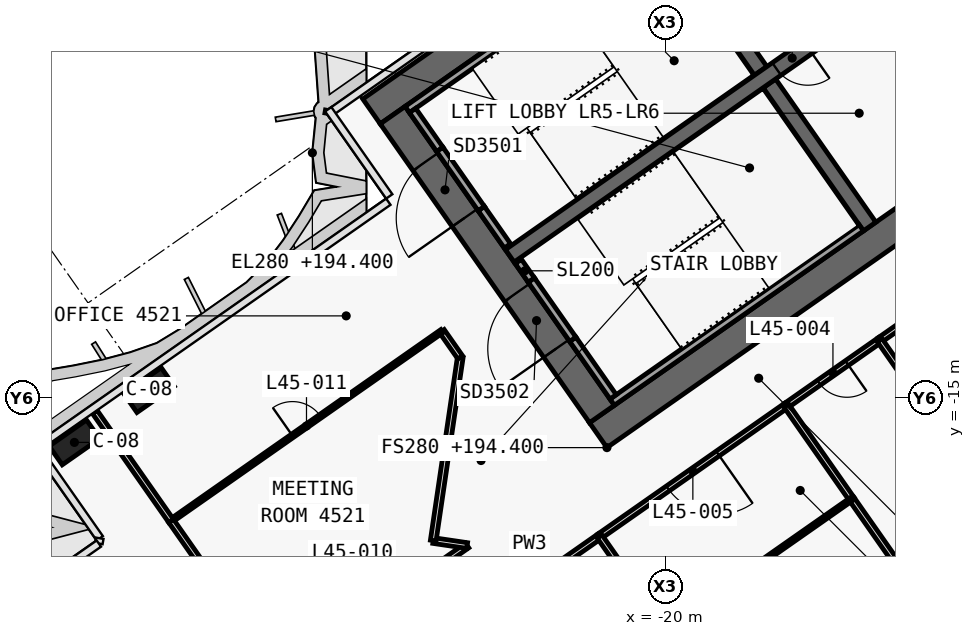
"""IFC4 building model, lengths in metres.
Left out: names, types, materials, properties, quantities, classifications, styles, units other than length and angle.
Written with IfcOpenShell. Run it as: python <this file> out.ifc"""

import sys

from ifc_helpers import new_model, si_unit, direction, frame, frame_2d, origin, origin_2d, place, context, subcontext, project, spatial, polyline, rectangle, outline, extrude, element, fill, save


model = new_model("IFC4")
c1 = context("Model", 3, precision=1e-05, world=origin(), true_north=direction((0.0, 1.0)))
c2 = subcontext(c1, "Body", "Model", "MODEL_VIEW")
j1 = project(units=[si_unit("LENGTHUNIT", "METRE"), si_unit("PLANEANGLEUNIT", "RADIAN")], contexts=[c1])
p1 = place(None, origin())
s1 = spatial("IfcSite", under=j1, at=p1, CompositionType="ELEMENT")
p2 = place(p1, origin())
s2 = spatial("IfcBuilding", under=s1, at=p2, CompositionType="ELEMENT")
p3 = place(p2, frame((0.0, 0.0, 194.4)))
s3 = spatial("IfcBuildingStorey", under=s2, at=p3, CompositionType="ELEMENT", Elevation=194.4)
p4 = place(p3, frame((0.029, 11.984, 0.0), z_axis=(0.0, 0.0, 1.0), x_axis=(-0.819151382952, -0.573577380837, 0.0)))
e1 = element("IfcWall", 1, at=p4, inside=s3, PredefinedType="SHEAR", context=c2, shape_type="SweptSolid", body=[
    extrude(outline(polyline([(33.898, 0.4), (0.56, 0.4), (-0.0, -0.4), (33.898, -0.4), (33.898, 0.4)])), origin(), (0.0, 0.0, 1.0), 3.9),
])
p5 = place(p3, frame((0.029, -0.712, 0.0), z_axis=(0.0, 0.0, 1.0), x_axis=(-0.819151758019, -0.573576845187, 0.0)))
e2 = element("IfcWall", 2, at=p5, inside=s3, PredefinedType="SHEAR", context=c2, shape_type="SweptSolid", body=[
    extrude(outline(polyline([(26.616, 0.4), (0.56, 0.4), (-0.0, -0.4), (26.616, -0.4), (26.616, 0.4)])), origin(), (0.0, 0.0, 1.0), 3.9),
])
p6 = place(p5, frame((2.966, 0.0, 0.0)))
e3 = element("IfcOpeningElement", 3, at=p6, cuts=e2, PredefinedType="OPENING", context=c2, shape_type="SweptSolid", body=[
    extrude(rectangle(XDim=2.4, YDim=2.1, at=frame_2d((1.2, 1.05))), frame((0.0, 0.41, 0.0), z_axis=(0.0, -1.0, 0.0), x_axis=(1.0, 0.0, 0.0)), (0.0, 0.0, 1.0), 0.82),
])
p7 = place(p5, frame((11.916, 0.0, 0.0)))
e4 = element("IfcOpeningElement", 4, at=p7, cuts=e2, PredefinedType="OPENING", context=c2, shape_type="SweptSolid", body=[
    extrude(rectangle(XDim=2.4, YDim=2.1, at=frame_2d((1.2, 1.05))), frame((0.0, 0.41, 0.0), z_axis=(0.0, -1.0, 0.0), x_axis=(1.0, 0.0, 0.0)), (0.0, 0.0, 1.0), 0.82),
])
p8 = place(p3, frame((-21.675, -15.421, 0.0), z_axis=(0.0, 0.0, 1.0), x_axis=(-0.573581815061, 0.819148278049, 0.0)))
e5 = element("IfcWall", 5, at=p8, inside=s3, PredefinedType="SHEAR", context=c2, shape_type="SweptSolid", body=[
    extrude(outline(polyline([(0.0, 0.4), (0.0, -0.4), (9.6, -0.4), (9.6, 0.4), (0.0, 0.4)])), origin(), (0.0, 0.0, 1.0), 3.9),
])
p9 = place(p8, frame((6.3, 0.0, 0.0)))
e6 = element("IfcOpeningElement", 6, at=p9, cuts=e5, PredefinedType="OPENING", context=c2, shape_type="SweptSolid", body=[
    extrude(rectangle(XDim=1.8, YDim=2.1, at=frame_2d((0.9, 1.05))), frame((0.0, 0.41, 0.0), z_axis=(0.0, -1.0, 0.0), x_axis=(1.0, 0.0, 0.0)), (0.0, 0.0, 1.0), 0.82),
])
p10 = place(p8, frame((2.1, 0.0, 0.0)))
e7 = element("IfcOpeningElement", 7, at=p10, cuts=e5, PredefinedType="OPENING", context=c2, shape_type="SweptSolid", body=[
    extrude(rectangle(XDim=1.8, YDim=2.1, at=frame_2d((0.9, 1.05))), frame((0.0, 0.41, 0.0), z_axis=(0.0, -1.0, 0.0), x_axis=(1.0, 0.0, 0.0)), (0.0, 0.0, 1.0), 0.82),
])
p11 = place(p3, frame((-14.63, -10.488, 0.0), z_axis=(0.0, 0.0, 1.0), x_axis=(-0.573611936273, 0.819127185829, 0.0)))
e8 = element("IfcWall", 8, at=p11, inside=s3, PredefinedType="SHEAR", context=c2, shape_type="SweptSolid", body=[
    extrude(outline(polyline([(4.6, 0.2), (0.0, 0.2), (0.0, -0.2), (4.6, -0.2), (4.6, 0.2)])), origin(), (0.0, 0.0, 1.0), 3.9),
])
p12 = place(p3, frame((-17.498, -6.392, 0.0), z_axis=(0.0, 0.0, 1.0), x_axis=(-0.573611936273, 0.819127185829, 0.0)))
e9 = element("IfcWall", 9, at=p12, inside=s3, PredefinedType="SHEAR", context=c2, shape_type="SweptSolid", body=[
    extrude(outline(polyline([(4.6, -0.2), (4.6, 0.2), (0.0, 0.2), (0.0, -0.2), (4.6, -0.2)])), origin(), (0.0, 0.0, 1.0), 3.9),
])
p13 = place(p3, frame((-2.638, 3.768, 0.0), z_axis=(0.0, 0.0, 1.0), x_axis=(-0.81915267502, -0.573575535572, 0.0)))
e10 = element("IfcWall", 10, at=p13, inside=s3, PredefinedType="SHEAR", context=c2, shape_type="SweptSolid", body=[
    extrude(outline(polyline([(26.2, 0.2), (0.0, 0.2), (0.0, -0.2), (26.2, -0.2), (26.2, 0.2)])), origin(), (0.0, 0.0, 1.0), 3.9),
])
p14 = place(p13, frame((1.169, 0.0, 0.0)))
e11 = element("IfcOpeningElement", 11, at=p14, cuts=e10, PredefinedType="OPENING", context=c2, shape_type="SweptSolid", body=[
    extrude(rectangle(XDim=1.1, YDim=2.1, at=frame_2d((0.55, 1.05))), frame((0.0, 0.21, 0.0), z_axis=(0.0, -1.0, 0.0), x_axis=(1.0, 0.0, 0.0)), (0.0, 0.0, 1.0), 0.42),
])
p15 = place(p13, frame((3.206, 0.0, 0.0)))
e12 = element("IfcOpeningElement", 12, at=p15, cuts=e10, PredefinedType="OPENING", context=c2, shape_type="SweptSolid", body=[
    extrude(rectangle(XDim=1.1, YDim=2.1, at=frame_2d((0.55, 1.05))), frame((0.0, 0.21, 0.0), z_axis=(0.0, -1.0, 0.0), x_axis=(1.0, 0.0, 0.0)), (0.0, 0.0, 1.0), 0.42),
])
p16 = place(p13, frame((5.244, 0.0, 0.0)))
e13 = element("IfcOpeningElement", 13, at=p16, cuts=e10, PredefinedType="OPENING", context=c2, shape_type="SweptSolid", body=[
    extrude(rectangle(XDim=1.1, YDim=2.1, at=frame_2d((0.55, 1.05))), frame((0.0, 0.21, 0.0), z_axis=(0.0, -1.0, 0.0), x_axis=(1.0, 0.0, 0.0)), (0.0, 0.0, 1.0), 0.42),
])
p17 = place(p13, frame((7.281, 0.0, 0.0)))
e14 = element("IfcOpeningElement", 14, at=p17, cuts=e10, PredefinedType="OPENING", context=c2, shape_type="SweptSolid", body=[
    extrude(rectangle(XDim=1.1, YDim=2.1, at=frame_2d((0.55, 1.05))), frame((0.0, 0.21, 0.0), z_axis=(0.0, -1.0, 0.0), x_axis=(1.0, 0.0, 0.0)), (0.0, 0.0, 1.0), 0.42),
])
p18 = place(p13, frame((9.688, 0.0, 0.0)))
e15 = element("IfcOpeningElement", 15, at=p18, cuts=e10, PredefinedType="OPENING", context=c2, shape_type="SweptSolid", body=[
    extrude(rectangle(XDim=1.1, YDim=2.1, at=frame_2d((0.55, 1.05))), frame((0.0, 0.21, 0.0), z_axis=(0.0, -1.0, 0.0), x_axis=(1.0, 0.0, 0.0)), (0.0, 0.0, 1.0), 0.42),
])
p19 = place(p13, frame((11.863, 0.0, 0.0)))
e16 = element("IfcOpeningElement", 16, at=p19, cuts=e10, PredefinedType="OPENING", context=c2, shape_type="SweptSolid", body=[
    extrude(rectangle(XDim=1.1, YDim=2.1, at=frame_2d((0.55, 1.05))), frame((0.0, 0.21, 0.0), z_axis=(0.0, -1.0, 0.0), x_axis=(1.0, 0.0, 0.0)), (0.0, 0.0, 1.0), 0.42),
])
p20 = place(p13, frame((14.552, 0.0, 0.0)))
e17 = element("IfcOpeningElement", 17, at=p20, cuts=e10, PredefinedType="OPENING", context=c2, shape_type="SweptSolid", body=[
    extrude(rectangle(XDim=1.0, YDim=2.1, at=frame_2d((0.5, 1.05))), frame((0.0, 0.21, 0.0), z_axis=(0.0, -1.0, 0.0), x_axis=(1.0, 0.0, 0.0)), (0.0, 0.0, 1.0), 0.42),
])
p21 = place(p13, frame((16.627, 0.0, 0.0)))
e18 = element("IfcOpeningElement", 18, at=p21, cuts=e10, PredefinedType="OPENING", context=c2, shape_type="SweptSolid", body=[
    extrude(rectangle(XDim=1.0, YDim=2.1, at=frame_2d((0.5, 1.05))), frame((0.0, 0.21, 0.0), z_axis=(0.0, -1.0, 0.0), x_axis=(1.0, 0.0, 0.0)), (0.0, 0.0, 1.0), 0.42),
])
for number, where, z_axis, x_axis in (
    (19, (-33.591, -14.792, 0.0), (0.0, 0.0, 1.0), (-0.819, -0.574, 0.0)),
    (20, (-35.556, -16.168, 0.0), (0.0, 0.0, 1.0), (-0.819, -0.574, 0.0)),
):
    element("IfcColumn", number, at=place(p3, frame(where, z_axis=z_axis, x_axis=x_axis)), inside=s3, PredefinedType="COLUMN", context=c2, shape_type="SweptSolid", body=[
        extrude(rectangle(XDim=1.2, YDim=0.6, at=origin_2d()), origin(), (0.0, 0.0, 1.0), 3.9),
    ])
p22 = place(p3, frame((-20.243, -2.821, 0.0), z_axis=(0.0, 0.0, 1.0), x_axis=(-0.819141584393, -0.57359137434, 0.0)))
e21 = element("IfcWall", 21, at=p22, inside=s3, PredefinedType="SOLIDWALL", context=c2, shape_type="SweptSolid", body=[
    extrude(rectangle(XDim=8.0, YDim=0.2, at=frame_2d((4.0, 0.0))), origin(), (0.0, 0.0, 1.0), 3.62),
])
p23 = place(p3, frame((-24.162, -10.998, 0.0), z_axis=(0.0, 0.0, 1.0), x_axis=(-0.573612502218, 0.819126789514, 0.0)))
e22 = element("IfcWall", 22, at=p23, inside=s3, PredefinedType="SOLIDWALL", context=c2, shape_type="SweptSolid", body=[
    extrude(rectangle(XDim=1.2, YDim=0.2, at=frame_2d((0.6, 0.0))), origin(), (0.0, 0.0, 1.0), 3.62),
])
p24 = place(p3, frame((-25.94, -8.458, 0.0), z_axis=(0.0, 0.0, 1.0), x_axis=(-0.573619628835, 0.819121798889, 0.0)))
e23 = element("IfcWall", 23, at=p24, inside=s3, PredefinedType="SOLIDWALL", context=c2, shape_type="SweptSolid", body=[
    extrude(rectangle(XDim=1.25, YDim=0.2, at=frame_2d((0.625, 0.0))), origin(), (0.0, 0.0, 1.0), 3.62),
])
p25 = place(p3, frame((-24.85, -10.014, 2.15), z_axis=(0.0, 0.0, 1.0), x_axis=(-0.573505465124, 0.819201734296, 0.0)))
e24 = element("IfcWall", 24, at=p25, inside=s3, PredefinedType="SOLIDWALL", context=c2, shape_type="SweptSolid", body=[
    extrude(rectangle(XDim=1.9, YDim=0.2, at=frame_2d((0.95, 0.0))), origin(), (0.0, 0.0, 1.0), 1.47),
])
p26 = place(p3, frame((-14.851, -10.521, 0.0), z_axis=(0.0, 0.0, 1.0), x_axis=(-0.819141584393, -0.57359137434, 0.0)))
e25 = element("IfcWall", 25, at=p26, inside=s3, PredefinedType="SOLIDWALL", context=c2, shape_type="SweptSolid", body=[
    extrude(rectangle(XDim=8.0, YDim=0.2, at=frame_2d((4.0, 0.0))), origin(), (0.0, 0.0, 1.0), 3.62),
])
p27 = place(p3, frame((-21.38, -14.97, 0.0), z_axis=(0.0, 0.0, 1.0), x_axis=(-0.573559770908, 0.819163713305, 0.0)))
e26 = element("IfcWall", 26, at=p27, inside=s3, PredefinedType="SOLIDWALL", context=c2, shape_type="SweptSolid", body=[
    extrude(rectangle(XDim=1.85, YDim=0.2, at=frame_2d((0.925, 0.0))), origin(), (0.0, 0.0, 1.0), 3.62),
])
p28 = place(p3, frame((-23.531, -11.898, 0.0), z_axis=(0.0, 0.0, 1.0), x_axis=(-0.573708088123, 0.819059844958, 0.0)))
e27 = element("IfcWall", 27, at=p28, inside=s3, PredefinedType="SOLIDWALL", context=c2, shape_type="SweptSolid", body=[
    extrude(rectangle(XDim=0.6, YDim=0.2, at=frame_2d((0.3, 0.0))), origin(), (0.0, 0.0, 1.0), 3.62),
])
p29 = place(p3, frame((-22.441, -13.455, 2.15), z_axis=(0.0, 0.0, 1.0), x_axis=(-0.573591692345, 0.819141361715, 0.0)))
e28 = element("IfcWall", 28, at=p29, inside=s3, PredefinedType="SOLIDWALL", context=c2, shape_type="SweptSolid", body=[
    extrude(rectangle(XDim=1.9, YDim=0.2, at=frame_2d((0.95, 0.0))), origin(), (0.0, 0.0, 1.0), 1.47),
])
p30 = place(p3, frame((-30.146, -22.33, 0.0), z_axis=(0.0, 0.0, 1.0), x_axis=(0.819136512745, 0.573598617056, 0.0)))
e29 = element("IfcWall", 29, at=p30, inside=s3, PredefinedType="PARTITIONING", context=c2, shape_type="SweptSolid", body=[
    extrude(rectangle(XDim=6.011, YDim=0.15, at=frame_2d((3.006, 0.0))), origin(), (0.0, 0.0, 1.0), 3.0),
])
p31 = place(p30, frame((2.906, 0.0, 0.0)))
e30 = element("IfcOpeningElement", 30, at=p31, cuts=e29, PredefinedType="OPENING", context=c2, shape_type="SweptSolid", body=[
    extrude(rectangle(XDim=1.6, YDim=2.1, at=frame_2d((0.8, 1.05))), frame((0.0, 0.085, 0.0), z_axis=(0.0, -1.0, 0.0), x_axis=(1.0, 0.0, 0.0)), (0.0, 0.0, 1.0), 0.17),
])
p32 = place(p3, frame((-11.908, -11.757, 0.0), z_axis=(0.0, 0.0, 1.0), x_axis=(-0.81916700466, -0.573555070134, 0.0)))
e31 = element("IfcWall", 31, at=p32, inside=s3, PredefinedType="PARTITIONING", context=c2, shape_type="SweptSolid", body=[
    extrude(rectangle(XDim=3.004, YDim=0.15, at=frame_2d((1.502, 0.0))), origin(), (0.0, 0.0, 1.0), 3.0),
])
p33 = place(p32, frame((1.052, 0.0, 0.0)))
e32 = element("IfcOpeningElement", 32, at=p33, cuts=e31, PredefinedType="OPENING", context=c2, shape_type="SweptSolid", body=[
    extrude(rectangle(XDim=0.9, YDim=2.1, at=frame_2d((0.45, 1.05))), frame((0.0, 0.085, 0.0), z_axis=(0.0, -1.0, 0.0), x_axis=(1.0, 0.0, 0.0)), (0.0, 0.0, 1.0), 0.17),
])
p34 = place(p3, frame((-14.366, -13.477, 0.0), z_axis=(0.0, 0.0, 1.0), x_axis=(-0.81916700466, -0.573555070134, 0.0)))
e33 = element("IfcWall", 33, at=p34, inside=s3, PredefinedType="PARTITIONING", context=c2, shape_type="SweptSolid", body=[
    extrude(rectangle(XDim=3.004, YDim=0.15, at=frame_2d((1.502, 0.0))), origin(), (0.0, 0.0, 1.0), 3.62),
])
p35 = place(p34, frame((1.052, 0.0, 0.0)))
e34 = element("IfcOpeningElement", 34, at=p35, cuts=e33, PredefinedType="OPENING", context=c2, shape_type="SweptSolid", body=[
    extrude(rectangle(XDim=0.9, YDim=2.1, at=frame_2d((0.45, 1.05))), frame((0.0, 0.085, 0.0), z_axis=(0.0, -1.0, 0.0), x_axis=(1.0, 0.0, 0.0)), (0.0, 0.0, 1.0), 0.17),
])
p36 = place(p3, frame((-16.823, -15.198, 0.0), z_axis=(0.0, 0.0, 1.0), x_axis=(-0.819165052243, -0.573557858619, 0.0)))
e35 = element("IfcWall", 35, at=p36, inside=s3, PredefinedType="PARTITIONING", context=c2, shape_type="SweptSolid", body=[
    extrude(rectangle(XDim=6.004, YDim=0.15, at=frame_2d((3.002, 0.0))), origin(), (0.0, 0.0, 1.0), 3.0),
])
p37 = place(p36, frame((2.202, 0.0, 0.0)))
e36 = element("IfcOpeningElement", 36, at=p37, cuts=e35, PredefinedType="OPENING", context=c2, shape_type="SweptSolid", body=[
    extrude(rectangle(XDim=1.6, YDim=2.1, at=frame_2d((0.8, 1.05))), frame((0.0, 0.085, 0.0), z_axis=(0.0, -1.0, 0.0), x_axis=(1.0, 0.0, 0.0)), (0.0, 0.0, 1.0), 0.17),
])
p38 = place(p3, frame((-21.738, -18.639, 0.0), z_axis=(0.0, 0.0, 1.0), x_axis=(-0.81912240011, -0.573618770298, 0.0)))
e37 = element("IfcWall", 37, at=p38, inside=s3, PredefinedType="PARTITIONING", context=c2, shape_type="SweptSolid", body=[
    extrude(rectangle(XDim=4.504, YDim=0.15, at=frame_2d((2.252, 0.0))), origin(), (0.0, 0.0, 1.0), 3.62),
])
p39 = place(p38, frame((1.452, 0.0, 0.0)))
e38 = element("IfcOpeningElement", 38, at=p39, cuts=e37, PredefinedType="OPENING", context=c2, shape_type="SweptSolid", body=[
    extrude(rectangle(XDim=1.6, YDim=2.1, at=frame_2d((0.8, 1.05))), frame((0.0, 0.085, 0.0), z_axis=(0.0, -1.0, 0.0), x_axis=(1.0, 0.0, 0.0)), (0.0, 0.0, 1.0), 0.17),
])
p40 = place(p3, frame((-25.221, -18.883, 0.0), z_axis=(0.0, 0.0, 1.0), x_axis=(-0.989300612726, 0.145891389948, 0.0)))
e39 = element("IfcWall", 39, at=p40, inside=s3, PredefinedType="PARTITIONING", context=c2, shape_type="SweptSolid", body=[
    extrude(rectangle(XDim=0.902, YDim=0.15, at=frame_2d((0.451, 0.0))), origin(), (0.0, 0.0, 1.0), 3.0),
])
p41 = place(p3, frame((-26.114, -18.751, 0.0), z_axis=(0.0, 0.0, 1.0), x_axis=(0.145889309857, 0.989300919473, 0.0)))
e40 = element("IfcWall", 40, at=p41, inside=s3, PredefinedType="PARTITIONING", context=c2, shape_type="SweptSolid", body=[
    extrude(rectangle(XDim=4.871, YDim=0.15, at=frame_2d((2.436, 0.0))), origin(), (0.0, 0.0, 1.0), 3.0),
])
p42 = place(p3, frame((-25.403, -13.932, 0.0), z_axis=(0.0, 0.0, 1.0), x_axis=(-0.573520604239, 0.819191135519, 0.0)))
e41 = element("IfcWall", 41, at=p42, inside=s3, PredefinedType="PARTITIONING", context=c2, shape_type="SweptSolid", body=[
    extrude(rectangle(XDim=0.844, YDim=0.15, at=frame_2d((0.422, 0.0))), origin(), (0.0, 0.0, 1.0), 3.62),
])
p43 = place(p3, frame((-33.013, -18.232, 0.0), z_axis=(0.0, 0.0, 1.0), x_axis=(0.819151510326, 0.573577198928, 0.0)))
e42 = element("IfcWall", 42, at=p43, inside=s3, PredefinedType="PARTITIONING", context=c2, shape_type="SweptSolid", body=[
    extrude(rectangle(XDim=8.702, YDim=0.1, at=frame_2d((4.351, 0.0))), origin(), (0.0, 0.0, 1.0), 3.0),
])
p44 = place(p43, frame((3.901, 0.0, 0.0)))
e43 = element("IfcOpeningElement", 43, at=p44, cuts=e42, PredefinedType="OPENING", context=c2, shape_type="SweptSolid", body=[
    extrude(rectangle(XDim=0.9, YDim=2.1, at=frame_2d((0.45, 1.05))), frame((0.0, 0.06, 0.0), z_axis=(0.0, -1.0, 0.0), x_axis=(1.0, 0.0, 0.0)), (0.0, 0.0, 1.0), 0.12),
])
p45 = place(p3, frame((-33.013, -18.232, 0.0), z_axis=(0.0, 0.0, 1.0), x_axis=(-0.573555999232, 0.819166354134, 0.0)))
e44 = element("IfcWall", 44, at=p45, inside=s3, PredefinedType="PARTITIONING", context=c2, shape_type="SweptSolid", body=[
    extrude(rectangle(XDim=3.499, YDim=0.15, at=frame_2d((1.75, 0.0))), origin(), (0.0, 0.0, 1.0), 2.9),
])
p46 = place(p3, frame((-30.145, -22.328, 0.0), z_axis=(0.0, 0.0, 1.0), x_axis=(-0.573563925118, 0.819160804606, 0.0)))
e45 = element("IfcWall", 45, at=p46, inside=s3, PredefinedType="PARTITIONING", context=c2, shape_type="SweptSolid", body=[
    extrude(rectangle(XDim=5.0, YDim=0.15, at=frame_2d((2.5, 0.0))), origin(), (0.0, 0.0, 1.0), 3.0),
])
p47 = place(p3, frame((-10.066, -19.622, 0.0), z_axis=(0.0, 0.0, 1.0), x_axis=(-0.573575945067, 0.81915238829, 0.0)))
e46 = element("IfcWall", 46, at=p47, inside=s3, PredefinedType="PARTITIONING", context=c2, shape_type="SweptSolid", body=[
    extrude(rectangle(XDim=7.5, YDim=0.15, at=frame_2d((3.75, 0.0))), origin(), (0.0, 0.0, 1.0), 2.9),
])
p48 = place(p3, frame((-12.523, -21.343, 0.0), z_axis=(0.0, 0.0, 1.0), x_axis=(-0.573556991349, 0.819165659482, 0.0)))
e47 = element("IfcWall", 47, at=p48, inside=s3, PredefinedType="PARTITIONING", context=c2, shape_type="SweptSolid", body=[
    extrude(rectangle(XDim=4.501, YDim=0.15, at=frame_2d((2.25, 0.0))), origin(), (0.0, 0.0, 1.0), 2.9),
])
p49 = place(p3, frame((-15.103, -17.658, 0.0), z_axis=(0.0, 0.0, 1.0), x_axis=(-0.573604249862, 0.819132568355, 0.0)))
e48 = element("IfcWall", 48, at=p49, inside=s3, PredefinedType="PARTITIONING", context=c2, shape_type="SweptSolid", body=[
    extrude(rectangle(XDim=3.002, YDim=0.15, at=frame_2d((1.501, 0.0))), origin(), (0.0, 0.0, 1.0), 3.62),
])
p50 = place(p3, frame((-15.104, -17.657, 0.0), z_axis=(0.0, 0.0, 1.0), x_axis=(-0.819163097304, -0.573560650686, 0.0)))
e49 = element("IfcWall", 49, at=p50, inside=s3, PredefinedType="PARTITIONING", context=c2, shape_type="SweptSolid", body=[
    extrude(rectangle(XDim=6.0, YDim=0.1, at=frame_2d((3.0, 0.0))), origin(), (0.0, 0.0, 1.0), 3.0),
])
p51 = place(p50, frame((2.55, 0.0, 0.0)))
e50 = element("IfcOpeningElement", 50, at=p51, cuts=e49, PredefinedType="OPENING", context=c2, shape_type="SweptSolid", body=[
    extrude(rectangle(XDim=0.9, YDim=2.1, at=frame_2d((0.45, 1.05))), frame((0.0, 0.06, 0.0), z_axis=(0.0, -1.0, 0.0), x_axis=(1.0, 0.0, 0.0)), (0.0, 0.0, 1.0), 0.12),
])
p52 = place(p3, frame((-20.019, -21.098, 0.0), z_axis=(0.0, 0.0, 1.0), x_axis=(-0.573598887793, 0.819136323161, 0.0)))
e51 = element("IfcWall", 51, at=p52, inside=s3, PredefinedType="PARTITIONING", context=c2, shape_type="SweptSolid", body=[
    extrude(rectangle(XDim=3.0, YDim=0.15, at=frame_2d((1.5, 0.0))), origin(), (0.0, 0.0, 1.0), 3.62),
])
p53 = place(p21, origin())
e52 = element("IfcDoor", 52, at=p53, inside=s3, OperationType="SINGLE_SWING_RIGHT", PredefinedType="DOOR", context=c2, shape_type="SweptSolid", body=[
    extrude(rectangle(XDim=1.0, YDim=2.1, at=frame_2d((0.5, 1.05))), frame((0.0, 0.025, 0.0), z_axis=(0.0, -1.0, 0.0), x_axis=(1.0, 0.0, 0.0)), (0.0, 0.0, 1.0), 0.05),
])
fill(e18, e52)
p54 = place(p9, origin())
e53 = element("IfcDoor", 53, at=p54, inside=s3, OperationType="DOUBLE_DOOR_SINGLE_SWING", PredefinedType="DOOR", context=c2, shape_type="SweptSolid", body=[
    extrude(rectangle(XDim=1.8, YDim=2.1, at=frame_2d((0.9, 1.05))), frame((0.0, 0.025, 0.0), z_axis=(0.0, -1.0, 0.0), x_axis=(1.0, 0.0, 0.0)), (0.0, 0.0, 1.0), 0.05),
])
fill(e6, e53)
p55 = place(p10, origin())
e54 = element("IfcDoor", 54, at=p55, inside=s3, OperationType="DOUBLE_DOOR_SINGLE_SWING", PredefinedType="DOOR", context=c2, shape_type="SweptSolid", body=[
    extrude(rectangle(XDim=1.8, YDim=2.1, at=frame_2d((0.9, 1.05))), frame((0.0, 0.025, 0.0), z_axis=(0.0, -1.0, 0.0), x_axis=(1.0, 0.0, 0.0)), (0.0, 0.0, 1.0), 0.05),
])
fill(e7, e54)
p56 = place(p35, origin())
e55 = element("IfcDoor", 55, at=p56, inside=s3, OperationType="SINGLE_SWING_LEFT", PredefinedType="DOOR", context=c2, shape_type="SweptSolid", body=[
    extrude(rectangle(XDim=0.9, YDim=2.1, at=frame_2d((0.45, 1.05))), frame((0.0, 0.025, 0.0), z_axis=(0.0, -1.0, 0.0), x_axis=(1.0, 0.0, 0.0)), (0.0, 0.0, 1.0), 0.05),
])
fill(e34, e55)
p57 = place(p37, origin())
e56 = element("IfcDoor", 56, at=p57, inside=s3, OperationType="DOUBLE_DOOR_SINGLE_SWING", PredefinedType="DOOR", context=c2, shape_type="SweptSolid", body=[
    extrude(rectangle(XDim=1.6, YDim=2.1, at=frame_2d((0.8, 1.05))), frame((0.0, 0.025, 0.0), z_axis=(0.0, -1.0, 0.0), x_axis=(1.0, 0.0, 0.0)), (0.0, 0.0, 1.0), 0.05),
])
fill(e36, e56)
p58 = place(p51, origin())
e57 = element("IfcDoor", 57, at=p58, inside=s3, OperationType="SINGLE_SWING_RIGHT", PredefinedType="DOOR", context=c2, shape_type="SweptSolid", body=[
    extrude(rectangle(XDim=0.9, YDim=2.1, at=frame_2d((0.45, 1.05))), frame((0.0, 0.025, 0.0), z_axis=(0.0, -1.0, 0.0), x_axis=(1.0, 0.0, 0.0)), (0.0, 0.0, 1.0), 0.05),
])
fill(e50, e57)
p59 = place(p44, origin())
e58 = element("IfcDoor", 58, at=p59, inside=s3, OperationType="SINGLE_SWING_LEFT", PredefinedType="DOOR", context=c2, shape_type="SweptSolid", body=[
    extrude(rectangle(XDim=0.9, YDim=2.1, at=frame_2d((0.45, 1.05))), frame((0.0, 0.025, 0.0), z_axis=(0.0, -1.0, 0.0), x_axis=(1.0, 0.0, 0.0)), (0.0, 0.0, 1.0), 0.05),
])
fill(e43, e58)
save(model, sys.argv[1])
